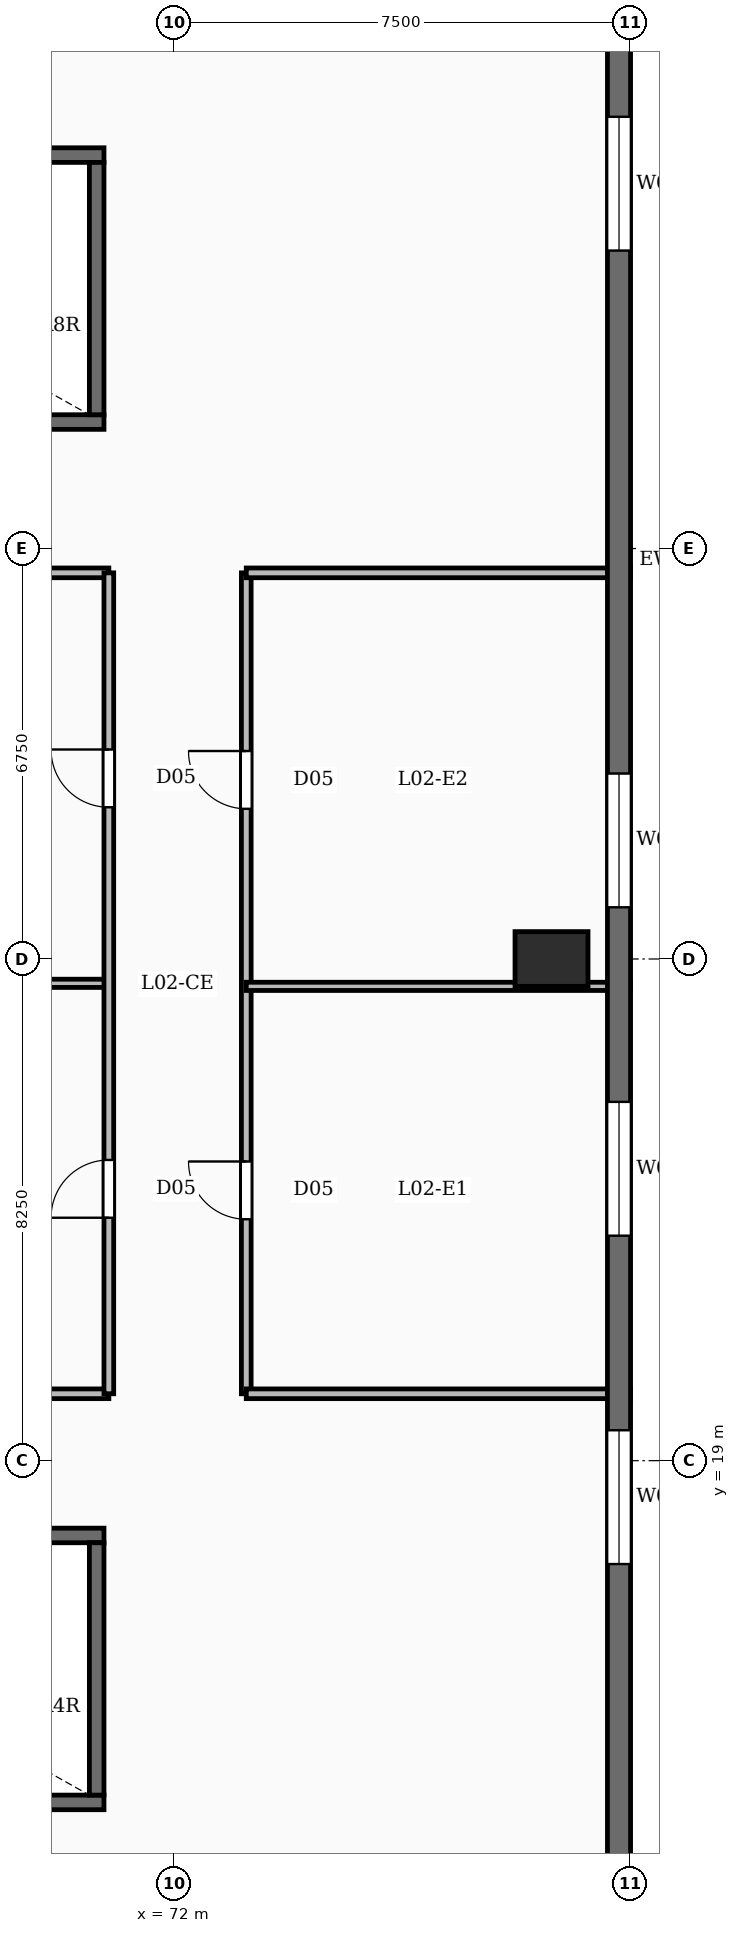
"""IFC4 building model, lengths in metres.
Left out: names, types, materials, properties, quantities, classifications, styles, units other than length and angle.
Written with IfcOpenShell. Run it as: python <this file> out.ifc"""

import sys

from ifc_helpers import new_model, si_unit, direction, frame, frame_2d, origin, origin_2d, place, context, subcontext, project, spatial, rectangle, extrude, element, fill, save


model = new_model("IFC4")
c1 = context("Model", 3, precision=1e-05, world=origin(), true_north=direction((0.0, 1.0)))
c2 = subcontext(c1, "Body", "Model", "MODEL_VIEW")
j1 = project(units=[si_unit("LENGTHUNIT", "METRE"), si_unit("PLANEANGLEUNIT", "RADIAN")], contexts=[c1])
p1 = place(None, origin())
s1 = spatial("IfcSite", under=j1, at=p1, CompositionType="ELEMENT")
p2 = place(p1, origin())
s2 = spatial("IfcBuilding", under=s1, at=p2, CompositionType="ELEMENT")
p3 = place(p2, frame((0.0, 0.0, 13.0)))
s3 = spatial("IfcBuildingStorey", under=s2, at=p3, CompositionType="ELEMENT", Elevation=13.0)
p4 = place(p3, frame((78.2, 27.25, -0.35), z_axis=(0.0, 0.0, 1.0), x_axis=(1.0, 0.0, 0.0)))
e1 = element("IfcColumn", 1, at=p4, inside=s3, PredefinedType="COLUMN", context=c2, shape_type="SweptSolid", body=[
    extrude(rectangle(XDim=1.2, YDim=0.9, at=origin_2d()), origin(), (0.0, 0.0, 1.0), 5.0),
])
p5 = place(p3, frame((79.31, 49.1, 0.0), z_axis=(0.0, 0.0, 1.0), x_axis=(0.0, -1.0, 0.0)))
e2 = element("IfcWall", 2, at=p5, inside=s3, PredefinedType="SOLIDWALL", context=c2, shape_type="SweptSolid", body=[
    extrude(rectangle(XDim=43.7, YDim=0.38, at=frame_2d((21.85, 0.0))), origin(), (0.0, 0.0, 1.0), 4.65),
])
p6 = place(p5, frame((2.6, 0.0, 0.95)))
e3 = element("IfcOpeningElement", 3, at=p6, cuts=e2, PredefinedType="OPENING", context=c2, shape_type="SweptSolid", body=[
    extrude(rectangle(XDim=2.2, YDim=2.5, at=frame_2d((1.1, 1.25))), frame((0.0, 0.2, 0.0), z_axis=(0.0, -1.0, 0.0), x_axis=(1.0, 0.0, 0.0)), (0.0, 0.0, 1.0), 0.4),
])
p7 = place(p5, frame((8.0, 0.0, 0.95)))
e4 = element("IfcOpeningElement", 4, at=p7, cuts=e2, PredefinedType="OPENING", context=c2, shape_type="SweptSolid", body=[
    extrude(rectangle(XDim=2.2, YDim=2.5, at=frame_2d((1.1, 1.25))), frame((0.0, 0.2, 0.0), z_axis=(0.0, -1.0, 0.0), x_axis=(1.0, 0.0, 0.0)), (0.0, 0.0, 1.0), 0.4),
])
p8 = place(p5, frame((18.8, 0.0, 0.95)))
e5 = element("IfcOpeningElement", 5, at=p8, cuts=e2, PredefinedType="OPENING", context=c2, shape_type="SweptSolid", body=[
    extrude(rectangle(XDim=2.2, YDim=2.5, at=frame_2d((1.1, 1.25))), frame((0.0, 0.2, 0.0), z_axis=(0.0, -1.0, 0.0), x_axis=(1.0, 0.0, 0.0)), (0.0, 0.0, 1.0), 0.4),
])
p9 = place(p5, frame((24.2, 0.0, 0.95)))
e6 = element("IfcOpeningElement", 6, at=p9, cuts=e2, PredefinedType="OPENING", context=c2, shape_type="SweptSolid", body=[
    extrude(rectangle(XDim=2.2, YDim=2.5, at=frame_2d((1.1, 1.25))), frame((0.0, 0.2, 0.0), z_axis=(0.0, -1.0, 0.0), x_axis=(1.0, 0.0, 0.0)), (0.0, 0.0, 1.0), 0.4),
])
p10 = place(p5, frame((29.6, 0.0, 0.95)))
e7 = element("IfcOpeningElement", 7, at=p10, cuts=e2, PredefinedType="OPENING", context=c2, shape_type="SweptSolid", body=[
    extrude(rectangle(XDim=2.2, YDim=2.5, at=frame_2d((1.1, 1.25))), frame((0.0, 0.2, 0.0), z_axis=(0.0, -1.0, 0.0), x_axis=(1.0, 0.0, 0.0)), (0.0, 0.0, 1.0), 0.4),
])
p11 = place(p3, frame((60.96, 17.77, 0.0), z_axis=(0.0, 0.0, 1.0), x_axis=(1.0, 0.0, 0.0)))
e8 = element("IfcWall", 8, at=p11, inside=s3, PredefinedType="SOLIDWALL", context=c2, shape_type="SweptSolid", body=[
    extrude(rectangle(XDim=9.88, YDim=0.24, at=frame_2d((4.94, 0.0))), origin(), (0.0, 0.0, 1.0), 4.65),
])
p12 = place(p11, frame((0.69, 0.0, 0.0)))
e9 = element("IfcOpeningElement", 9, at=p12, cuts=e8, PredefinedType="OPENING", context=c2, shape_type="SweptSolid", body=[
    extrude(rectangle(XDim=1.1, YDim=2.15, at=frame_2d((0.55, 1.075))), frame((0.0, 0.13, 0.0), z_axis=(0.0, -1.0, 0.0), x_axis=(1.0, 0.0, 0.0)), (0.0, 0.0, 1.0), 0.26),
])
p13 = place(p3, frame((60.96, 13.38, 0.0), z_axis=(0.0, 0.0, 1.0), x_axis=(1.0, 0.0, 0.0)))
e10 = element("IfcWall", 10, at=p13, inside=s3, PredefinedType="SOLIDWALL", context=c2, shape_type="SweptSolid", body=[
    extrude(rectangle(XDim=9.88, YDim=0.24, at=frame_2d((4.94, 0.0))), origin(), (0.0, 0.0, 1.0), 4.65),
])
p14 = place(p3, frame((70.72, 13.5, 0.0), z_axis=(0.0, 0.0, 1.0), x_axis=(0.0, 1.0, 0.0)))
e11 = element("IfcWall", 11, at=p14, inside=s3, PredefinedType="SOLIDWALL", context=c2, shape_type="SweptSolid", body=[
    extrude(rectangle(XDim=4.15, YDim=0.24, at=frame_2d((2.075, 0.0))), origin(), (0.0, 0.0, 1.0), 4.65),
])
p15 = place(p3, frame((70.84, 36.08, 0.0), z_axis=(0.0, 0.0, 1.0), x_axis=(-1.0, 0.0, 0.0)))
e12 = element("IfcWall", 12, at=p15, inside=s3, PredefinedType="SOLIDWALL", context=c2, shape_type="SweptSolid", body=[
    extrude(rectangle(XDim=9.88, YDim=0.24, at=frame_2d((4.94, 0.0))), origin(), (0.0, 0.0, 1.0), 4.65),
])
p16 = place(p15, frame((8.09, 0.0, 0.0)))
e13 = element("IfcOpeningElement", 13, at=p16, cuts=e12, PredefinedType="OPENING", context=c2, shape_type="SweptSolid", body=[
    extrude(rectangle(XDim=1.1, YDim=2.15, at=frame_2d((0.55, 1.075))), frame((0.0, 0.13, 0.0), z_axis=(0.0, -1.0, 0.0), x_axis=(1.0, 0.0, 0.0)), (0.0, 0.0, 1.0), 0.26),
])
p17 = place(p3, frame((60.96, 40.47, 0.0), z_axis=(0.0, 0.0, 1.0), x_axis=(1.0, 0.0, 0.0)))
e14 = element("IfcWall", 14, at=p17, inside=s3, PredefinedType="SOLIDWALL", context=c2, shape_type="SweptSolid", body=[
    extrude(rectangle(XDim=9.88, YDim=0.24, at=frame_2d((4.94, 0.0))), origin(), (0.0, 0.0, 1.0), 4.65),
])
p18 = place(p3, frame((70.72, 36.2, 0.0), z_axis=(0.0, 0.0, 1.0), x_axis=(0.0, 1.0, 0.0)))
e15 = element("IfcWall", 15, at=p18, inside=s3, PredefinedType="SOLIDWALL", context=c2, shape_type="SweptSolid", body=[
    extrude(rectangle(XDim=4.15, YDim=0.24, at=frame_2d((2.075, 0.0))), origin(), (0.0, 0.0, 1.0), 4.65),
])
p19 = place(p3, frame((73.18, 26.8, 0.0), z_axis=(0.0, 0.0, 1.0), x_axis=(1.0, 0.0, 0.0)))
e16 = element("IfcWall", 16, at=p19, inside=s3, PredefinedType="PARTITIONING", context=c2, shape_type="SweptSolid", body=[
    extrude(rectangle(XDim=6.32, YDim=0.135, at=frame_2d((3.16, 0.0))), origin(), (0.0, 0.0, 1.0), 3.71),
])
p20 = place(p3, frame((60.88, 26.85, 0.0), z_axis=(0.0, 0.0, 1.0), x_axis=(1.0, 0.0, 0.0)))
e17 = element("IfcWall", 17, at=p20, inside=s3, PredefinedType="PARTITIONING", context=c2, shape_type="SweptSolid", body=[
    extrude(rectangle(XDim=10.04, YDim=0.135, at=frame_2d((5.02, 0.0))), origin(), (0.0, 0.0, 1.0), 3.71),
])
p21 = place(p3, frame((70.92, 20.1, 0.0), z_axis=(0.0, 0.0, 1.0), x_axis=(0.0, 1.0, 0.0)))
e18 = element("IfcWall", 18, at=p21, inside=s3, PredefinedType="PARTITIONING", context=c2, shape_type="SweptSolid", body=[
    extrude(rectangle(XDim=13.5, YDim=0.16, at=frame_2d((6.75, 0.0))), origin(), (0.0, 0.0, 1.0), 3.71),
])
p22 = place(p21, frame((2.895, 0.0, 0.0)))
e19 = element("IfcOpeningElement", 19, at=p22, cuts=e18, PredefinedType="OPENING", context=c2, shape_type="SweptSolid", body=[
    extrude(rectangle(XDim=0.95, YDim=2.15, at=frame_2d((0.475, 1.075))), frame((0.0, 0.09, 0.0), z_axis=(0.0, -1.0, 0.0), x_axis=(1.0, 0.0, 0.0)), (0.0, 0.0, 1.0), 0.18),
])
p23 = place(p21, frame((9.645, 0.0, 0.0)))
e20 = element("IfcOpeningElement", 20, at=p23, cuts=e18, PredefinedType="OPENING", context=c2, shape_type="SweptSolid", body=[
    extrude(rectangle(XDim=0.95, YDim=2.15, at=frame_2d((0.475, 1.075))), frame((0.0, 0.09, 0.0), z_axis=(0.0, -1.0, 0.0), x_axis=(1.0, 0.0, 0.0)), (0.0, 0.0, 1.0), 0.18),
])
p24 = place(p3, frame((73.18, 20.1, 0.0), z_axis=(0.0, 0.0, 1.0), x_axis=(0.0, 1.0, 0.0)))
e21 = element("IfcWall", 21, at=p24, inside=s3, PredefinedType="PARTITIONING", context=c2, shape_type="SweptSolid", body=[
    extrude(rectangle(XDim=13.5, YDim=0.16, at=frame_2d((6.75, 0.0))), origin(), (0.0, 0.0, 1.0), 3.71),
])
p25 = place(p24, frame((2.87, 0.0, 0.0)))
e22 = element("IfcOpeningElement", 22, at=p25, cuts=e21, PredefinedType="OPENING", context=c2, shape_type="SweptSolid", body=[
    extrude(rectangle(XDim=0.95, YDim=2.15, at=frame_2d((0.475, 1.075))), frame((0.0, 0.09, 0.0), z_axis=(0.0, -1.0, 0.0), x_axis=(1.0, 0.0, 0.0)), (0.0, 0.0, 1.0), 0.18),
])
p26 = place(p24, frame((9.62, 0.0, 0.0)))
e23 = element("IfcOpeningElement", 23, at=p26, cuts=e21, PredefinedType="OPENING", context=c2, shape_type="SweptSolid", body=[
    extrude(rectangle(XDim=0.95, YDim=2.15, at=frame_2d((0.475, 1.075))), frame((0.0, 0.09, 0.0), z_axis=(0.0, -1.0, 0.0), x_axis=(1.0, 0.0, 0.0)), (0.0, 0.0, 1.0), 0.18),
])
for number, where, z_axis, x_axis in (
    (24, (60.88, 20.1, 0.0), (0.0, 0.0, 1.0), (1.0, 0.0, 0.0)),
    (25, (60.88, 33.6, 0.0), (0.0, 0.0, 1.0), (1.0, 0.0, 0.0)),
):
    element("IfcWall", number, at=place(p3, frame(where, z_axis=z_axis, x_axis=x_axis)), inside=s3, PredefinedType="PARTITIONING", context=c2, shape_type="SweptSolid", body=[
        extrude(rectangle(XDim=10.04, YDim=0.16, at=frame_2d((5.02, 0.0))), origin(), (0.0, 0.0, 1.0), 3.71),
    ])
for number, where, z_axis, x_axis in (
    (26, (73.18, 20.1, 0.0), (0.0, 0.0, 1.0), (1.0, 0.0, 0.0)),
    (27, (73.18, 33.6, 0.0), (0.0, 0.0, 1.0), (1.0, 0.0, 0.0)),
):
    element("IfcWall", number, at=place(p3, frame(where, z_axis=z_axis, x_axis=x_axis)), inside=s3, PredefinedType="PARTITIONING", context=c2, shape_type="SweptSolid", body=[
        extrude(rectangle(XDim=6.32, YDim=0.16, at=frame_2d((3.16, 0.0))), origin(), (0.0, 0.0, 1.0), 3.71),
    ])
p27 = place(p7, origin())
e28 = element("IfcWindow", 28, at=p27, inside=s3, PartitioningType="DOUBLE_PANEL_VERTICAL", PredefinedType="WINDOW", context=c2, shape_type="SweptSolid", body=[
    extrude(rectangle(XDim=2.2, YDim=2.5, at=frame_2d((1.1, 1.25))), frame((0.0, 0.03, 0.0), z_axis=(0.0, -1.0, 0.0), x_axis=(1.0, 0.0, 0.0)), (0.0, 0.0, 1.0), 0.06),
])
fill(e4, e28)
p28 = place(p8, origin())
e29 = element("IfcWindow", 29, at=p28, inside=s3, PartitioningType="DOUBLE_PANEL_VERTICAL", PredefinedType="WINDOW", context=c2, shape_type="SweptSolid", body=[
    extrude(rectangle(XDim=2.2, YDim=2.5, at=frame_2d((1.1, 1.25))), frame((0.0, 0.03, 0.0), z_axis=(0.0, -1.0, 0.0), x_axis=(1.0, 0.0, 0.0)), (0.0, 0.0, 1.0), 0.06),
])
fill(e5, e29)
p29 = place(p9, origin())
e30 = element("IfcWindow", 30, at=p29, inside=s3, PartitioningType="DOUBLE_PANEL_VERTICAL", PredefinedType="WINDOW", context=c2, shape_type="SweptSolid", body=[
    extrude(rectangle(XDim=2.2, YDim=2.5, at=frame_2d((1.1, 1.25))), frame((0.0, 0.03, 0.0), z_axis=(0.0, -1.0, 0.0), x_axis=(1.0, 0.0, 0.0)), (0.0, 0.0, 1.0), 0.06),
])
fill(e6, e30)
p30 = place(p10, origin())
e31 = element("IfcWindow", 31, at=p30, inside=s3, PartitioningType="DOUBLE_PANEL_VERTICAL", PredefinedType="WINDOW", context=c2, shape_type="SweptSolid", body=[
    extrude(rectangle(XDim=2.2, YDim=2.5, at=frame_2d((1.1, 1.25))), frame((0.0, 0.03, 0.0), z_axis=(0.0, -1.0, 0.0), x_axis=(1.0, 0.0, 0.0)), (0.0, 0.0, 1.0), 0.06),
])
fill(e7, e31)
p31 = place(p22, origin())
e32 = element("IfcDoor", 32, at=p31, inside=s3, OperationType="SINGLE_SWING_LEFT", PredefinedType="DOOR", context=c2, shape_type="SweptSolid", body=[
    extrude(rectangle(XDim=0.95, YDim=2.15, at=frame_2d((0.475, 1.075))), frame((0.0, 0.025, 0.0), z_axis=(0.0, -1.0, 0.0), x_axis=(1.0, 0.0, 0.0)), (0.0, 0.0, 1.0), 0.05),
])
fill(e19, e32)
p32 = place(p23, origin())
e33 = element("IfcDoor", 33, at=p32, inside=s3, OperationType="SINGLE_SWING_RIGHT", PredefinedType="DOOR", context=c2, shape_type="SweptSolid", body=[
    extrude(rectangle(XDim=0.95, YDim=2.15, at=frame_2d((0.475, 1.075))), frame((0.0, 0.025, 0.0), z_axis=(0.0, -1.0, 0.0), x_axis=(1.0, 0.0, 0.0)), (0.0, 0.0, 1.0), 0.05),
])
fill(e20, e33)
p33 = place(p25, origin())
e34 = element("IfcDoor", 34, at=p33, inside=s3, OperationType="SINGLE_SWING_RIGHT", PredefinedType="DOOR", context=c2, shape_type="SweptSolid", body=[
    extrude(rectangle(XDim=0.95, YDim=2.15, at=frame_2d((0.475, 1.075))), frame((0.0, 0.025, 0.0), z_axis=(0.0, -1.0, 0.0), x_axis=(1.0, 0.0, 0.0)), (0.0, 0.0, 1.0), 0.05),
])
fill(e22, e34)
p34 = place(p26, origin())
e35 = element("IfcDoor", 35, at=p34, inside=s3, OperationType="SINGLE_SWING_RIGHT", PredefinedType="DOOR", context=c2, shape_type="SweptSolid", body=[
    extrude(rectangle(XDim=0.95, YDim=2.15, at=frame_2d((0.475, 1.075))), frame((0.0, 0.025, 0.0), z_axis=(0.0, -1.0, 0.0), x_axis=(1.0, 0.0, 0.0)), (0.0, 0.0, 1.0), 0.05),
])
fill(e23, e35)
save(model, sys.argv[1])
